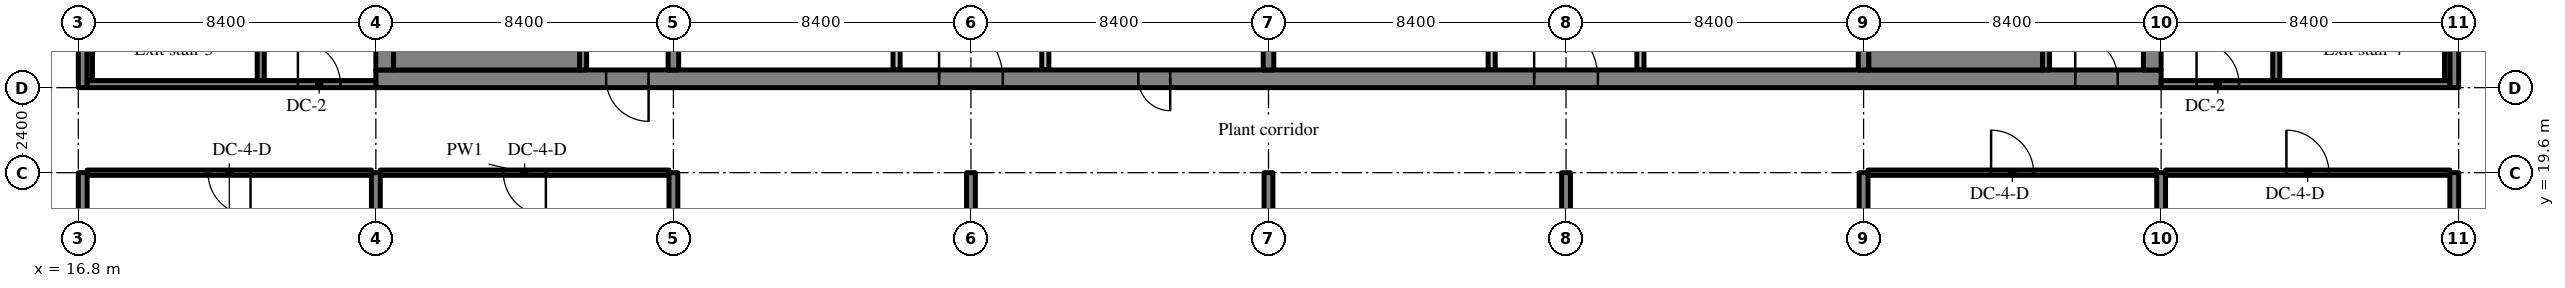
"""IFC4 building model, lengths in metres.
Left out: names, types, materials, properties, quantities, classifications, styles, units other than length and angle.
Written with IfcOpenShell. Run it as: python <this file> out.ifc"""

import sys

from ifc_helpers import new_model, si_unit, direction, frame, frame_2d, origin, place, context, subcontext, project, spatial, rectangle, extrude, source, transform, mapped, element, fill, save


model = new_model("IFC4")
c1 = context("Model", 3, precision=1e-05, world=origin(), true_north=direction((0.0, 1.0)))
c2 = subcontext(c1, "Body", "Model", "MODEL_VIEW")
j1 = project(units=[si_unit("LENGTHUNIT", "METRE"), si_unit("PLANEANGLEUNIT", "RADIAN")], contexts=[c1])
p1 = place(None, origin())
s1 = spatial("IfcSite", under=j1, at=p1, CompositionType="ELEMENT")
p2 = place(p1, origin())
s2 = spatial("IfcBuilding", under=s1, at=p2, CompositionType="ELEMENT")
p3 = place(p2, frame((0.0, 0.0, 317.7)))
s3 = spatial("IfcBuildingStorey", under=s2, at=p3, CompositionType="ELEMENT", Elevation=317.7)
m1 = source(origin(), c2, "Body", "SweptSolid", [
    extrude(rectangle(XDim=50.4, YDim=0.5, at=frame_2d((25.2, 0.0))), origin(), (0.0, 0.0, 1.0), 5.72),
])
p4 = place(p3, frame((25.2, 22.25, 0.0), z_axis=(0.0, 0.0, 1.0), x_axis=(1.0, 0.0, 0.0)))
e1 = element("IfcWall", 1, at=p4, inside=s3, PredefinedType="SHEAR", context=c2, shape_type="MappedRepresentation", body=[
    mapped(m1, transform((0.0, 0.0, 0.0), scale=1.0)),
])
m2 = source(origin(), c2, "Body", "SweptSolid", [
    extrude(rectangle(XDim=1.8, YDim=2.1, at=frame_2d((0.9, 1.05))), frame((0.0, 0.26, 0.0), z_axis=(0.0, -1.0, 0.0), x_axis=(1.0, 0.0, 0.0)), (0.0, 0.0, 1.0), 0.52),
])
p5 = place(p4, frame((15.9, 0.0, 0.0)))
e2 = element("IfcOpeningElement", 2, at=p5, cuts=e1, PredefinedType="OPENING", context=c2, shape_type="MappedRepresentation", body=[
    mapped(m2, transform((0.0, 0.0, 0.0), scale=1.0)),
])
m3 = source(origin(), c2, "Body", "SweptSolid", [
    extrude(rectangle(XDim=0.9, YDim=2.1, at=frame_2d((0.45, 1.05))), frame((0.0, 0.26, 0.0), z_axis=(0.0, -1.0, 0.0), x_axis=(1.0, 0.0, 0.0)), (0.0, 0.0, 1.0), 0.52),
])
p6 = place(p4, frame((21.525, 0.0, 0.0)))
e3 = element("IfcOpeningElement", 3, at=p6, cuts=e1, PredefinedType="OPENING", context=c2, shape_type="MappedRepresentation", body=[
    mapped(m3, transform((0.0, 0.0, 0.0), scale=1.0)),
])
p7 = place(p4, frame((32.7, 0.0, 0.0)))
e4 = element("IfcOpeningElement", 4, at=p7, cuts=e1, PredefinedType="OPENING", context=c2, shape_type="MappedRepresentation", body=[
    mapped(m2, transform((0.0, 0.0, 0.0), scale=1.0)),
])
m4 = source(origin(), c2, "Body", "SweptSolid", [
    extrude(rectangle(XDim=1.2, YDim=2.1, at=frame_2d((0.6, 1.05))), frame((0.0, 0.26, 0.0), z_axis=(0.0, -1.0, 0.0), x_axis=(1.0, 0.0, 0.0)), (0.0, 0.0, 1.0), 0.52),
])
p8 = place(p4, frame((6.5, 0.0, 0.0)))
e5 = element("IfcOpeningElement", 5, at=p8, cuts=e1, PredefinedType="OPENING", context=c2, shape_type="MappedRepresentation", body=[
    mapped(m4, transform((0.0, 0.0, 0.0), scale=1.0)),
])
p9 = place(p4, frame((47.975, 0.0, 0.0)))
e6 = element("IfcOpeningElement", 6, at=p9, cuts=e1, PredefinedType="OPENING", context=c2, shape_type="MappedRepresentation", body=[
    mapped(m4, transform((0.0, 0.0, 0.0), scale=1.0)),
])
m5 = source(origin(), c2, "Body", "SweptSolid", [
    extrude(rectangle(XDim=19.0, YDim=0.5, at=frame_2d((9.5, 0.0))), origin(), (0.0, 0.0, 1.0), 5.72),
])
p10 = place(p3, frame((25.45, 22.5, 0.0), z_axis=(0.0, 0.0, 1.0), x_axis=(0.0, 1.0, 0.0)))
e7 = element("IfcWall", 7, at=p10, inside=s3, PredefinedType="SHEAR", context=c2, shape_type="MappedRepresentation", body=[
    mapped(m5, transform((0.0, 0.0, 0.0), scale=1.0)),
])
p11 = place(p3, frame((75.35, 22.5, 0.0), z_axis=(0.0, 0.0, 1.0), x_axis=(0.0, 1.0, 0.0)))
e8 = element("IfcWall", 8, at=p11, inside=s3, PredefinedType="SHEAR", context=c2, shape_type="MappedRepresentation", body=[
    mapped(m5, transform((0.0, 0.0, 0.0), scale=1.0)),
])
p12 = place(p11, frame((12.9, 0.0, 0.0)))
e9 = element("IfcOpeningElement", 9, at=p12, cuts=e8, PredefinedType="OPENING", context=c2, shape_type="MappedRepresentation", body=[
    mapped(m4, transform((0.0, 0.0, 0.0), scale=1.0)),
])
m6 = source(origin(), c2, "Body", "SweptSolid", [
    extrude(rectangle(XDim=19.0, YDim=0.3, at=frame_2d((9.5, 0.0))), origin(), (0.0, 0.0, 1.0), 5.72),
])
p13 = place(p3, frame((33.6, 22.5, 0.0), z_axis=(0.0, 0.0, 1.0), x_axis=(0.0, 1.0, 0.0)))
e10 = element("IfcWall", 10, at=p13, inside=s3, PredefinedType="SHEAR", context=c2, shape_type="MappedRepresentation", body=[
    mapped(m6, transform((0.0, 0.0, 0.0), scale=1.0)),
])
m7 = source(origin(), c2, "Body", "SweptSolid", [
    extrude(rectangle(XDim=1.1, YDim=2.1, at=frame_2d((0.55, 1.05))), frame((0.0, 0.16, 0.0), z_axis=(0.0, -1.0, 0.0), x_axis=(1.0, 0.0, 0.0)), (0.0, 0.0, 1.0), 0.32),
])
p14 = place(p13, frame((12.95, 0.0, 0.0)))
e11 = element("IfcOpeningElement", 11, at=p14, cuts=e10, PredefinedType="OPENING", context=c2, shape_type="MappedRepresentation", body=[
    mapped(m7, transform((0.0, 0.0, 0.0), scale=1.0)),
])
p15 = place(p3, frame((50.4, 22.5, 0.0), z_axis=(0.0, 0.0, 1.0), x_axis=(0.0, 1.0, 0.0)))
e12 = element("IfcWall", 12, at=p15, inside=s3, PredefinedType="SHEAR", context=c2, shape_type="MappedRepresentation", body=[
    mapped(m6, transform((0.0, 0.0, 0.0), scale=1.0)),
])
p16 = place(p15, frame((12.95, 0.0, 0.0)))
e13 = element("IfcOpeningElement", 13, at=p16, cuts=e12, PredefinedType="OPENING", context=c2, shape_type="MappedRepresentation", body=[
    mapped(m7, transform((0.0, 0.0, 0.0), scale=1.0)),
])
p17 = place(p3, frame((67.2, 22.5, 0.0), z_axis=(0.0, 0.0, 1.0), x_axis=(0.0, 1.0, 0.0)))
e14 = element("IfcWall", 14, at=p17, inside=s3, PredefinedType="SHEAR", context=c2, shape_type="MappedRepresentation", body=[
    mapped(m6, transform((0.0, 0.0, 0.0), scale=1.0)),
])
m8 = source(origin(), c2, "Body", "SweptSolid", [
    extrude(rectangle(XDim=12.5, YDim=0.25, at=frame_2d((6.25, 0.0))), origin(), (0.0, 0.0, 1.0), 5.72),
])
p18 = place(p3, frame((16.925, 7.1, 0.0), z_axis=(0.0, 0.0, 1.0), x_axis=(0.0, 1.0, 0.0)))
e15 = element("IfcWall", 15, at=p18, inside=s3, PredefinedType="SHEAR", context=c2, shape_type="MappedRepresentation", body=[
    mapped(m8, transform((0.0, 0.0, 0.0), scale=1.0)),
])
m9 = source(origin(), c2, "Body", "SweptSolid", [
    extrude(rectangle(XDim=18.4, YDim=0.25, at=frame_2d((9.2, 0.0))), origin(), (0.0, 0.0, 1.0), 5.72),
])
p19 = place(p3, frame((16.925, 22.0, 0.0), z_axis=(0.0, 0.0, 1.0), x_axis=(0.0, 1.0, 0.0)))
e16 = element("IfcWall", 16, at=p19, inside=s3, PredefinedType="SHEAR", context=c2, shape_type="MappedRepresentation", body=[
    mapped(m9, transform((0.0, 0.0, 0.0), scale=1.0)),
])
m10 = source(origin(), c2, "Body", "SweptSolid", [
    extrude(rectangle(XDim=14.1, YDim=0.25, at=frame_2d((7.05, 0.0))), origin(), (0.0, 0.0, 1.0), 5.72),
])
for number, where, z_axis, x_axis in (
    (17, (25.2, 5.5, 0.0), (0.0, 0.0, 1.0), (0.0, 1.0, 0.0)),
    (18, (33.6, 5.5, 0.0), (0.0, 0.0, 1.0), (0.0, 1.0, 0.0)),
    (19, (42.0, 5.5, 0.0), (0.0, 0.0, 1.0), (0.0, 1.0, 0.0)),
):
    element("IfcWall", number, at=place(p3, frame(where, z_axis=z_axis, x_axis=x_axis)), inside=s3, PredefinedType="SHEAR", context=c2, shape_type="MappedRepresentation", body=[
        mapped(m10, transform((0.0, 0.0, 0.0), scale=1.0)),
    ])
m11 = source(origin(), c2, "Body", "SweptSolid", [
    extrude(rectangle(XDim=13.1, YDim=0.25, at=frame_2d((6.55, 0.0))), origin(), (0.0, 0.0, 1.0), 5.72),
])
p20 = place(p3, frame((50.4, 6.5, 0.0), z_axis=(0.0, 0.0, 1.0), x_axis=(0.0, 1.0, 0.0)))
e20 = element("IfcWall", 20, at=p20, inside=s3, PredefinedType="SHEAR", context=c2, shape_type="MappedRepresentation", body=[
    mapped(m11, transform((0.0, 0.0, 0.0), scale=1.0)),
])
for number, where, z_axis, x_axis in (
    (21, (58.8, 5.5, 0.0), (0.0, 0.0, 1.0), (0.0, 1.0, 0.0)),
    (22, (67.2, 5.5, 0.0), (0.0, 0.0, 1.0), (0.0, 1.0, 0.0)),
    (23, (75.6, 5.5, 0.0), (0.0, 0.0, 1.0), (0.0, 1.0, 0.0)),
):
    element("IfcWall", number, at=place(p3, frame(where, z_axis=z_axis, x_axis=x_axis)), inside=s3, PredefinedType="SHEAR", context=c2, shape_type="MappedRepresentation", body=[
        mapped(m10, transform((0.0, 0.0, 0.0), scale=1.0)),
    ])
p21 = place(p3, frame((83.875, 7.1, 0.0), z_axis=(0.0, 0.0, 1.0), x_axis=(0.0, 1.0, 0.0)))
e24 = element("IfcWall", 24, at=p21, inside=s3, PredefinedType="SHEAR", context=c2, shape_type="MappedRepresentation", body=[
    mapped(m8, transform((0.0, 0.0, 0.0), scale=1.0)),
])
p22 = place(p3, frame((83.875, 22.0, 0.0), z_axis=(0.0, 0.0, 1.0), x_axis=(0.0, 1.0, 0.0)))
e25 = element("IfcWall", 25, at=p22, inside=s3, PredefinedType="SHEAR", context=c2, shape_type="MappedRepresentation", body=[
    mapped(m9, transform((0.0, 0.0, 0.0), scale=1.0)),
])
m12 = source(origin(), c2, "Body", "SweptSolid", [
    extrude(rectangle(XDim=8.95, YDim=0.2, at=frame_2d((4.475, 0.0))), origin(), (0.0, 0.0, 1.0), 5.72),
])
p23 = place(p3, frame((39.9, 22.5, 0.0), z_axis=(0.0, 0.0, 1.0), x_axis=(0.0, 1.0, 0.0)))
e26 = element("IfcWall", 26, at=p23, inside=s3, PredefinedType="PARTITIONING", context=c2, shape_type="MappedRepresentation", body=[
    mapped(m12, transform((0.0, 0.0, 0.0), scale=1.0)),
])
m13 = source(origin(), c2, "Body", "SweptSolid", [
    extrude(rectangle(XDim=0.9, YDim=2.1, at=frame_2d((0.45, 1.05))), frame((0.0, 0.11, 0.0), z_axis=(0.0, -1.0, 0.0), x_axis=(1.0, 0.0, 0.0)), (0.0, 0.0, 1.0), 0.22),
])
p24 = place(p23, frame((4.05, 0.0, 0.0)))
e27 = element("IfcOpeningElement", 27, at=p24, cuts=e26, PredefinedType="OPENING", context=c2, shape_type="MappedRepresentation", body=[
    mapped(m13, transform((0.0, 0.0, 0.0), scale=1.0)),
])
m14 = source(origin(), c2, "Body", "SweptSolid", [
    extrude(rectangle(XDim=2.8, YDim=0.2, at=frame_2d((1.4, 0.0))), origin(), (0.0, 0.0, 1.0), 5.72),
])
p25 = place(p3, frame((44.1, 22.5, 0.0), z_axis=(0.0, 0.0, 1.0), x_axis=(0.0, 1.0, 0.0)))
e28 = element("IfcWall", 28, at=p25, inside=s3, PredefinedType="PARTITIONING", context=c2, shape_type="MappedRepresentation", body=[
    mapped(m14, transform((0.0, 0.0, 0.0), scale=1.0)),
])
for number, where, z_axis, x_axis in (
    (29, (60.9, 22.5, 0.0), (0.0, 0.0, 1.0), (0.0, 1.0, 0.0)),
    (30, (56.7, 22.5, 0.0), (0.0, 0.0, 1.0), (0.0, 1.0, 0.0)),
):
    element("IfcWall", number, at=place(p3, frame(where, z_axis=z_axis, x_axis=x_axis)), inside=s3, PredefinedType="SOLIDWALL", context=c2, shape_type="MappedRepresentation", body=[
        mapped(m14, transform((0.0, 0.0, 0.0), scale=1.0)),
    ])
m15 = source(origin(), c2, "Body", "SweptSolid", [
    extrude(rectangle(XDim=8.95, YDim=0.2, at=frame_2d((4.475, 0.0))), origin(), (0.0, 0.0, 1.0), 5.72),
])
p26 = place(p3, frame((31.05, 22.5, 0.0), z_axis=(0.0, 0.0, 1.0), x_axis=(0.0, 1.0, 0.0)))
e31 = element("IfcWall", 31, at=p26, inside=s3, PredefinedType="SOLIDWALL", context=c2, shape_type="MappedRepresentation", body=[
    mapped(m15, transform((0.0, 0.0, 0.0), scale=1.0)),
])
m16 = source(origin(), c2, "Body", "SweptSolid", [
    extrude(rectangle(XDim=1.2, YDim=2.1, at=frame_2d((0.6, 1.05))), frame((0.0, 0.11, 0.0), z_axis=(0.0, -1.0, 0.0), x_axis=(1.0, 0.0, 0.0)), (0.0, 0.0, 1.0), 0.22),
])
p27 = place(p26, frame((7.0, 0.0, 0.0)))
e32 = element("IfcOpeningElement", 32, at=p27, cuts=e31, PredefinedType="OPENING", context=c2, shape_type="MappedRepresentation", body=[
    mapped(m16, transform((0.0, 0.0, 0.0), scale=1.0)),
])
p28 = place(p3, frame((72.35, 22.5, 0.0), z_axis=(0.0, 0.0, 1.0), x_axis=(0.0, 1.0, 0.0)))
e33 = element("IfcWall", 33, at=p28, inside=s3, PredefinedType="SOLIDWALL", context=c2, shape_type="MappedRepresentation", body=[
    mapped(m15, transform((0.0, 0.0, 0.0), scale=1.0)),
])
p29 = place(p28, frame((7.0, 0.0, 0.0)))
e34 = element("IfcOpeningElement", 34, at=p29, cuts=e33, PredefinedType="OPENING", context=c2, shape_type="MappedRepresentation", body=[
    mapped(m16, transform((0.0, 0.0, 0.0), scale=1.0)),
])
m17 = source(origin(), c2, "Body", "SweptSolid", [
    extrude(rectangle(XDim=8.3, YDim=0.2, at=frame_2d((4.15, 0.0))), origin(), (0.0, 0.0, 1.0), 5.72),
])
p30 = place(p3, frame((21.95, 22.1, 0.0), z_axis=(0.0, 0.0, 1.0), x_axis=(0.0, 1.0, 0.0)))
e35 = element("IfcWall", 35, at=p30, inside=s3, PredefinedType="SOLIDWALL", context=c2, shape_type="MappedRepresentation", body=[
    mapped(m17, transform((0.0, 0.0, 0.0), scale=1.0)),
])
p31 = place(p30, frame((6.5, 0.0, 0.0)))
e36 = element("IfcOpeningElement", 36, at=p31, cuts=e35, PredefinedType="OPENING", context=c2, shape_type="MappedRepresentation", body=[
    mapped(m16, transform((0.0, 0.0, 0.0), scale=1.0)),
])
m18 = source(origin(), c2, "Body", "SweptSolid", [
    extrude(rectangle(XDim=8.15, YDim=0.2, at=frame_2d((4.075, 0.0))), origin(), (0.0, 0.0, 1.0), 5.72),
])
p32 = place(p3, frame((17.05, 22.1, 0.0), z_axis=(0.0, 0.0, 1.0), x_axis=(1.0, 0.0, 0.0)))
e37 = element("IfcWall", 37, at=p32, inside=s3, PredefinedType="SOLIDWALL", context=c2, shape_type="MappedRepresentation", body=[
    mapped(m18, transform((0.0, 0.0, 0.0), scale=1.0)),
])
p33 = place(p32, frame((5.95, 0.0, 0.0)))
e38 = element("IfcOpeningElement", 38, at=p33, cuts=e37, PredefinedType="OPENING", context=c2, shape_type="MappedRepresentation", body=[
    mapped(m16, transform((0.0, 0.0, 0.0), scale=1.0)),
])
p34 = place(p3, frame((78.85, 22.1, 0.0), z_axis=(0.0, 0.0, 1.0), x_axis=(0.0, 1.0, 0.0)))
e39 = element("IfcWall", 39, at=p34, inside=s3, PredefinedType="SOLIDWALL", context=c2, shape_type="MappedRepresentation", body=[
    mapped(m17, transform((0.0, 0.0, 0.0), scale=1.0)),
])
p35 = place(p34, frame((6.5, 0.0, 0.0)))
e40 = element("IfcOpeningElement", 40, at=p35, cuts=e39, PredefinedType="OPENING", context=c2, shape_type="MappedRepresentation", body=[
    mapped(m16, transform((0.0, 0.0, 0.0), scale=1.0)),
])
p36 = place(p3, frame((83.75, 22.1, 0.0), z_axis=(0.0, 0.0, 1.0), x_axis=(-1.0, 0.0, 0.0)))
e41 = element("IfcWall", 41, at=p36, inside=s3, PredefinedType="SOLIDWALL", context=c2, shape_type="MappedRepresentation", body=[
    mapped(m18, transform((0.0, 0.0, 0.0), scale=1.0)),
])
p37 = place(p36, frame((5.95, 0.0, 0.0)))
e42 = element("IfcOpeningElement", 42, at=p37, cuts=e41, PredefinedType="OPENING", context=c2, shape_type="MappedRepresentation", body=[
    mapped(m16, transform((0.0, 0.0, 0.0), scale=1.0)),
])
m19 = source(origin(), c2, "Body", "SweptSolid", [
    extrude(rectangle(XDim=5.25, YDim=0.6, at=frame_2d((2.625, 0.0))), origin(), (0.0, 0.0, 1.0), 5.72),
])
p38 = place(p3, frame((25.7, 22.8, 0.0), z_axis=(0.0, 0.0, 1.0), x_axis=(1.0, 0.0, 0.0)))
e43 = element("IfcWall", 43, at=p38, inside=s3, PredefinedType="SOLIDWALL", context=c2, shape_type="MappedRepresentation", body=[
    mapped(m19, transform((0.0, 0.0, 0.0), scale=1.0)),
])
m20 = source(origin(), c2, "Body", "SweptSolid", [
    extrude(rectangle(XDim=4.9, YDim=0.6, at=frame_2d((2.45, 0.0))), origin(), (0.0, 0.0, 1.0), 5.72),
])
p39 = place(p3, frame((67.35, 22.8, 0.0), z_axis=(0.0, 0.0, 1.0), x_axis=(1.0, 0.0, 0.0)))
e44 = element("IfcWall", 44, at=p39, inside=s3, PredefinedType="SOLIDWALL", context=c2, shape_type="MappedRepresentation", body=[
    mapped(m20, transform((0.0, 0.0, 0.0), scale=1.0)),
])
m21 = source(origin(), c2, "Body", "SweptSolid", [
    extrude(rectangle(XDim=8.1, YDim=0.15, at=frame_2d((4.05, 0.0))), origin(), (0.0, 0.0, 1.0), 5.72),
])
for number, where, z_axis, x_axis in (
    (45, (17.125, 22.2, 0.0), (0.0, 0.0, 1.0), (0.0, 1.0, 0.0)),
    (46, (83.675, 22.2, 0.0), (0.0, 0.0, 1.0), (0.0, 1.0, 0.0)),
):
    element("IfcWall", number, at=place(p3, frame(where, z_axis=z_axis, x_axis=x_axis)), inside=s3, PredefinedType="SOLIDWALL", context=c2, shape_type="MappedRepresentation", body=[
        mapped(m21, transform((0.0, 0.0, 0.0), scale=1.0)),
    ])
m22 = source(origin(), c2, "Body", "SweptSolid", [
    extrude(rectangle(XDim=8.025, YDim=0.15, at=frame_2d((4.012, 0.0))), origin(), (0.0, 0.0, 1.0), 4.97),
])
p40 = place(p3, frame((17.05, 19.6, 0.0), z_axis=(0.0, 0.0, 1.0), x_axis=(1.0, 0.0, 0.0)))
e47 = element("IfcWall", 47, at=p40, inside=s3, PredefinedType="PARTITIONING", context=c2, shape_type="MappedRepresentation", body=[
    mapped(m22, transform((0.0, 0.0, 0.0), scale=1.0)),
])
m23 = source(origin(), c2, "Body", "SweptSolid", [
    extrude(rectangle(XDim=1.2, YDim=2.1, at=frame_2d((0.6, 1.05))), frame((0.0, 0.085, 0.0), z_axis=(0.0, -1.0, 0.0), x_axis=(1.0, 0.0, 0.0)), (0.0, 0.0, 1.0), 0.17),
])
p41 = place(p40, frame((3.412, 0.0, 0.0)))
e48 = element("IfcOpeningElement", 48, at=p41, cuts=e47, PredefinedType="OPENING", context=c2, shape_type="MappedRepresentation", body=[
    mapped(m23, transform((0.0, 0.0, 0.0), scale=1.0)),
])
m24 = source(origin(), c2, "Body", "SweptSolid", [
    extrude(rectangle(XDim=8.15, YDim=0.15, at=frame_2d((4.075, 0.0))), origin(), (0.0, 0.0, 1.0), 4.97),
])
p42 = place(p3, frame((25.325, 19.6, 0.0), z_axis=(0.0, 0.0, 1.0), x_axis=(1.0, 0.0, 0.0)))
e49 = element("IfcWall", 49, at=p42, inside=s3, PredefinedType="PARTITIONING", context=c2, shape_type="MappedRepresentation", body=[
    mapped(m24, transform((0.0, 0.0, 0.0), scale=1.0)),
])
p43 = place(p42, frame((3.475, 0.0, 0.0)))
e50 = element("IfcOpeningElement", 50, at=p43, cuts=e49, PredefinedType="OPENING", context=c2, shape_type="MappedRepresentation", body=[
    mapped(m23, transform((0.0, 0.0, 0.0), scale=1.0)),
])
p44 = place(p3, frame((67.325, 19.6, 0.0), z_axis=(0.0, 0.0, 1.0), x_axis=(1.0, 0.0, 0.0)))
e51 = element("IfcWall", 51, at=p44, inside=s3, PredefinedType="PARTITIONING", context=c2, shape_type="MappedRepresentation", body=[
    mapped(m24, transform((0.0, 0.0, 0.0), scale=1.0)),
])
p45 = place(p44, frame((3.475, 0.0, 0.0)))
e52 = element("IfcOpeningElement", 52, at=p45, cuts=e51, PredefinedType="OPENING", context=c2, shape_type="MappedRepresentation", body=[
    mapped(m23, transform((0.0, 0.0, 0.0), scale=1.0)),
])
p46 = place(p3, frame((75.725, 19.6, 0.0), z_axis=(0.0, 0.0, 1.0), x_axis=(1.0, 0.0, 0.0)))
e53 = element("IfcWall", 53, at=p46, inside=s3, PredefinedType="PARTITIONING", context=c2, shape_type="MappedRepresentation", body=[
    mapped(m22, transform((0.0, 0.0, 0.0), scale=1.0)),
])
p47 = place(p46, frame((3.412, 0.0, 0.0)))
e54 = element("IfcOpeningElement", 54, at=p47, cuts=e53, PredefinedType="OPENING", context=c2, shape_type="MappedRepresentation", body=[
    mapped(m23, transform((0.0, 0.0, 0.0), scale=1.0)),
])
m25 = source(origin(), c2, "Body", "SweptSolid", [
    extrude(rectangle(XDim=1.8, YDim=2.1, at=frame_2d((0.9, 1.05))), frame((0.0, 0.175, 0.0), z_axis=(0.0, -1.0, 0.0), x_axis=(1.0, 0.0, 0.0)), (0.0, 0.0, 1.0), 0.05),
])
p48 = place(p5, origin())
e55 = element("IfcDoor", 55, at=p48, inside=s3, OperationType="DOUBLE_DOOR_SINGLE_SWING", PredefinedType="DOOR", context=c2, shape_type="MappedRepresentation", body=[
    mapped(m25, transform((0.0, 0.0, 0.0), scale=1.0)),
])
fill(e2, e55)
m26 = source(origin(), c2, "Body", "SweptSolid", [
    extrude(rectangle(XDim=0.9, YDim=2.1, at=frame_2d((0.45, 1.05))), frame((0.0, 0.175, 0.0), z_axis=(0.0, -1.0, 0.0), x_axis=(1.0, 0.0, 0.0)), (0.0, 0.0, 1.0), 0.05),
])
p49 = place(p6, origin())
e56 = element("IfcDoor", 56, at=p49, inside=s3, OperationType="SINGLE_SWING_RIGHT", PredefinedType="DOOR", context=c2, shape_type="MappedRepresentation", body=[
    mapped(m26, transform((0.0, 0.0, 0.0), scale=1.0)),
])
fill(e3, e56)
p50 = place(p7, origin())
e57 = element("IfcDoor", 57, at=p50, inside=s3, OperationType="DOUBLE_DOOR_SINGLE_SWING", PredefinedType="DOOR", context=c2, shape_type="MappedRepresentation", body=[
    mapped(m25, transform((0.0, 0.0, 0.0), scale=1.0)),
])
fill(e4, e57)
m27 = source(origin(), c2, "Body", "SweptSolid", [
    extrude(rectangle(XDim=1.2, YDim=2.1, at=frame_2d((0.6, 1.05))), frame((0.0, 0.175, 0.0), z_axis=(0.0, -1.0, 0.0), x_axis=(1.0, 0.0, 0.0)), (0.0, 0.0, 1.0), 0.05),
])
p51 = place(p8, origin())
e58 = element("IfcDoor", 58, at=p51, inside=s3, OperationType="SINGLE_SWING_RIGHT", PredefinedType="DOOR", context=c2, shape_type="MappedRepresentation", body=[
    mapped(m27, transform((0.0, 0.0, 0.0), scale=1.0)),
])
fill(e5, e58)
p52 = place(p9, origin())
e59 = element("IfcDoor", 59, at=p52, inside=s3, OperationType="SINGLE_SWING_LEFT", PredefinedType="DOOR", context=c2, shape_type="MappedRepresentation", body=[
    mapped(m27, transform((0.0, 0.0, 0.0), scale=1.0)),
])
fill(e6, e59)
m28 = source(origin(), c2, "Body", "SweptSolid", [
    extrude(rectangle(XDim=1.2, YDim=2.1, at=frame_2d((0.6, 1.05))), frame((0.0, 0.025, 0.0), z_axis=(0.0, -1.0, 0.0), x_axis=(1.0, 0.0, 0.0)), (0.0, 0.0, 1.0), 0.05),
])
p53 = place(p33, origin())
e60 = element("IfcDoor", 60, at=p53, inside=s3, OperationType="SINGLE_SWING_LEFT", PredefinedType="DOOR", context=c2, shape_type="MappedRepresentation", body=[
    mapped(m28, transform((0.0, 0.0, 0.0), scale=1.0)),
])
fill(e38, e60)
p54 = place(p37, origin())
e61 = element("IfcDoor", 61, at=p54, inside=s3, OperationType="SINGLE_SWING_RIGHT", PredefinedType="DOOR", context=c2, shape_type="MappedRepresentation", body=[
    mapped(m28, transform((0.0, 0.0, 0.0), scale=1.0)),
])
fill(e42, e61)
p55 = place(p41, origin())
e62 = element("IfcDoor", 62, at=p55, inside=s3, OperationType="SINGLE_SWING_RIGHT", PredefinedType="DOOR", context=c2, shape_type="MappedRepresentation", body=[
    mapped(m28, transform((0.0, 0.0, 0.0), scale=1.0)),
])
fill(e48, e62)
p56 = place(p43, origin())
e63 = element("IfcDoor", 63, at=p56, inside=s3, OperationType="SINGLE_SWING_RIGHT", PredefinedType="DOOR", context=c2, shape_type="MappedRepresentation", body=[
    mapped(m28, transform((0.0, 0.0, 0.0), scale=1.0)),
])
fill(e50, e63)
p57 = place(p45, origin())
e64 = element("IfcDoor", 64, at=p57, inside=s3, OperationType="SINGLE_SWING_LEFT", PredefinedType="DOOR", context=c2, shape_type="MappedRepresentation", body=[
    mapped(m28, transform((0.0, 0.0, 0.0), scale=1.0)),
])
fill(e52, e64)
p58 = place(p47, origin())
e65 = element("IfcDoor", 65, at=p58, inside=s3, OperationType="SINGLE_SWING_LEFT", PredefinedType="DOOR", context=c2, shape_type="MappedRepresentation", body=[
    mapped(m28, transform((0.0, 0.0, 0.0), scale=1.0)),
])
fill(e54, e65)
save(model, sys.argv[1])
